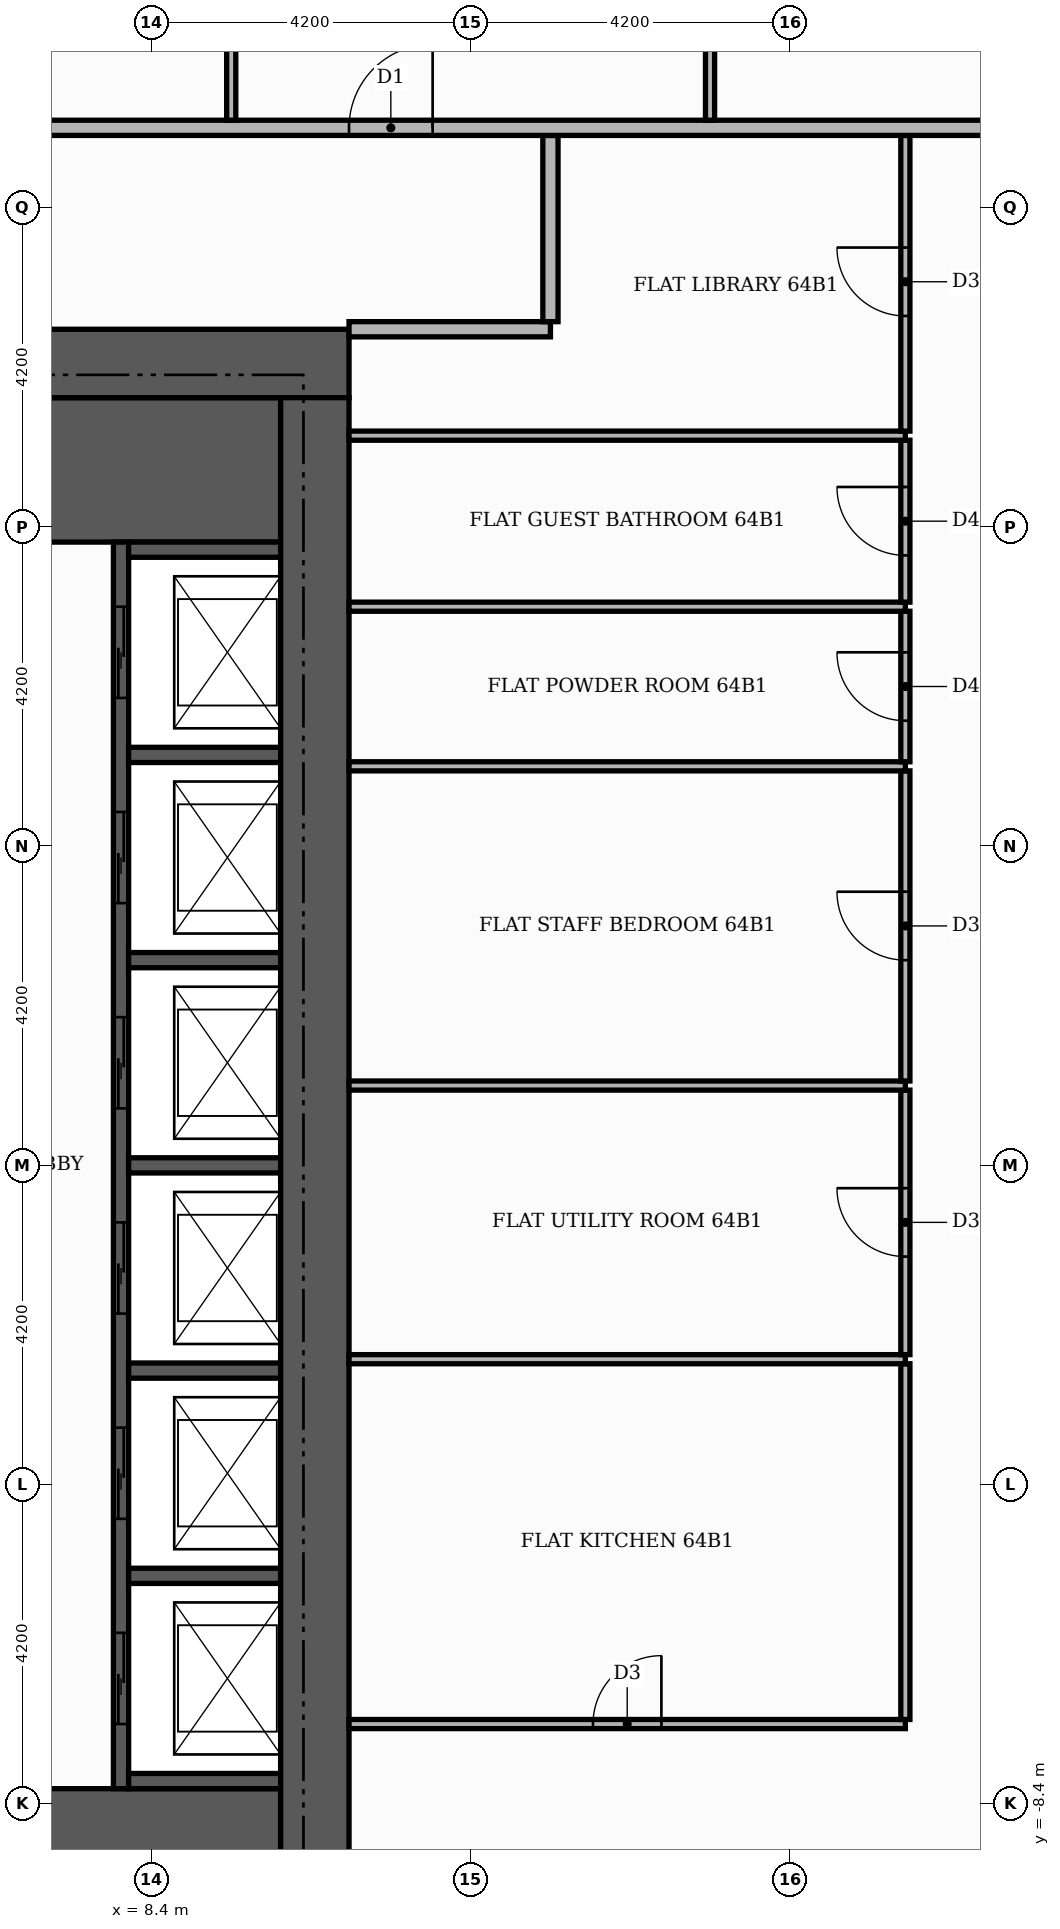
"""IFC4 building model, lengths in metres.
Left out: names, types, materials, properties, quantities, classifications, styles, units other than length and angle.
Written with IfcOpenShell. Run it as: python <this file> out.ifc"""

import sys

from ifc_helpers import new_model, si_unit, direction, frame, frame_2d, origin, place, context, subcontext, project, spatial, rectangle, extrude, element, fill, save


model = new_model("IFC4")
c1 = context("Model", 3, precision=1e-05, world=origin(), true_north=direction((0.0, 1.0)))
c2 = subcontext(c1, "Body", "Model", "MODEL_VIEW")
j1 = project(units=[si_unit("LENGTHUNIT", "METRE"), si_unit("PLANEANGLEUNIT", "RADIAN")], contexts=[c1])
p1 = place(None, origin())
s1 = spatial("IfcSite", under=j1, at=p1, CompositionType="ELEMENT")
p2 = place(p1, origin())
s2 = spatial("IfcBuilding", under=s1, at=p2, CompositionType="ELEMENT")
p3 = place(p2, frame((0.0, 0.0, 267.9)))
s3 = spatial("IfcBuildingStorey", under=s2, at=p3, CompositionType="ELEMENT", Elevation=267.9)
for number, where, z_axis, x_axis in (
    (1, (5.5, -9.15, 0.0), (0.0, 0.0, 1.0), (1.0, 0.0, 0.0)),
    (2, (5.5, 9.15, 0.0), (0.0, 0.0, 1.0), (1.0, 0.0, 0.0)),
):
    element("IfcWall", number, at=place(p3, frame(where, z_axis=z_axis, x_axis=x_axis)), inside=s3, PredefinedType="SHEAR", context=c2, shape_type="SweptSolid", body=[
        extrude(rectangle(XDim=4.6, YDim=1.9, at=frame_2d((2.3, 0.0))), origin(), (0.0, 0.0, 1.0), 3.48),
    ])
p4 = place(p3, frame((8.0, -8.2, 0.0), z_axis=(0.0, 0.0, 1.0), x_axis=(0.0, 1.0, 0.0)))
e3 = element("IfcWall", 3, at=p4, inside=s3, PredefinedType="SHEAR", context=c2, shape_type="SweptSolid", body=[
    extrude(rectangle(XDim=16.4, YDim=0.2, at=frame_2d((8.2, 0.0))), origin(), (0.0, 0.0, 1.0), 3.48),
])
p5 = place(p4, frame((0.85, 0.0, 0.0)))
e4 = element("IfcOpeningElement", 4, at=p5, cuts=e3, PredefinedType="OPENING", context=c2, shape_type="SweptSolid", body=[
    extrude(rectangle(XDim=1.2, YDim=2.1, at=frame_2d((0.6, 1.05))), frame((0.0, 0.11, 0.0), z_axis=(0.0, -1.0, 0.0), x_axis=(1.0, 0.0, 0.0)), (0.0, 0.0, 1.0), 0.22),
])
p6 = place(p4, frame((3.55, 0.0, 0.0)))
e5 = element("IfcOpeningElement", 5, at=p6, cuts=e3, PredefinedType="OPENING", context=c2, shape_type="SweptSolid", body=[
    extrude(rectangle(XDim=1.2, YDim=2.1, at=frame_2d((0.6, 1.05))), frame((0.0, 0.11, 0.0), z_axis=(0.0, -1.0, 0.0), x_axis=(1.0, 0.0, 0.0)), (0.0, 0.0, 1.0), 0.22),
])
p7 = place(p4, frame((6.25, 0.0, 0.0)))
e6 = element("IfcOpeningElement", 6, at=p7, cuts=e3, PredefinedType="OPENING", context=c2, shape_type="SweptSolid", body=[
    extrude(rectangle(XDim=1.2, YDim=2.1, at=frame_2d((0.6, 1.05))), frame((0.0, 0.11, 0.0), z_axis=(0.0, -1.0, 0.0), x_axis=(1.0, 0.0, 0.0)), (0.0, 0.0, 1.0), 0.22),
])
p8 = place(p4, frame((8.95, 0.0, 0.0)))
e7 = element("IfcOpeningElement", 7, at=p8, cuts=e3, PredefinedType="OPENING", context=c2, shape_type="SweptSolid", body=[
    extrude(rectangle(XDim=1.2, YDim=2.1, at=frame_2d((0.6, 1.05))), frame((0.0, 0.11, 0.0), z_axis=(0.0, -1.0, 0.0), x_axis=(1.0, 0.0, 0.0)), (0.0, 0.0, 1.0), 0.22),
])
p9 = place(p4, frame((11.65, 0.0, 0.0)))
e8 = element("IfcOpeningElement", 8, at=p9, cuts=e3, PredefinedType="OPENING", context=c2, shape_type="SweptSolid", body=[
    extrude(rectangle(XDim=1.2, YDim=2.1, at=frame_2d((0.6, 1.05))), frame((0.0, 0.11, 0.0), z_axis=(0.0, -1.0, 0.0), x_axis=(1.0, 0.0, 0.0)), (0.0, 0.0, 1.0), 0.22),
])
p10 = place(p4, frame((14.35, 0.0, 0.0)))
e9 = element("IfcOpeningElement", 9, at=p10, cuts=e3, PredefinedType="OPENING", context=c2, shape_type="SweptSolid", body=[
    extrude(rectangle(XDim=1.2, YDim=2.1, at=frame_2d((0.6, 1.05))), frame((0.0, 0.11, 0.0), z_axis=(0.0, -1.0, 0.0), x_axis=(1.0, 0.0, 0.0)), (0.0, 0.0, 1.0), 0.22),
])
for number, where, z_axis, x_axis in (
    (10, (8.1, -8.1, 0.0), (0.0, 0.0, 1.0), (1.0, 0.0, 0.0)),
    (11, (8.1, -5.4, 0.0), (0.0, 0.0, 1.0), (1.0, 0.0, 0.0)),
    (12, (8.1, -2.7, 0.0), (0.0, 0.0, 1.0), (1.0, 0.0, 0.0)),
    (13, (8.1, 0.0, 0.0), (0.0, 0.0, 1.0), (1.0, 0.0, 0.0)),
    (14, (8.1, 2.7, 0.0), (0.0, 0.0, 1.0), (1.0, 0.0, 0.0)),
    (15, (8.1, 5.4, 0.0), (0.0, 0.0, 1.0), (1.0, 0.0, 0.0)),
    (16, (8.1, 8.1, 0.0), (0.0, 0.0, 1.0), (1.0, 0.0, 0.0)),
):
    element("IfcWall", number, at=place(p3, frame(where, z_axis=z_axis, x_axis=x_axis)), inside=s3, PredefinedType="SHEAR", context=c2, shape_type="SweptSolid", body=[
        extrude(rectangle(XDim=2.0, YDim=0.2, at=frame_2d((1.0, 0.0))), origin(), (0.0, 0.0, 1.0), 3.48),
    ])
p11 = place(p3, frame((-11.0, 10.55, 0.0), z_axis=(0.0, 0.0, 1.0), x_axis=(1.0, 0.0, 0.0)))
e17 = element("IfcWall", 17, at=p11, inside=s3, PredefinedType="SHEAR", context=c2, shape_type="SweptSolid", body=[
    extrude(rectangle(XDim=22.0, YDim=0.9, at=frame_2d((11.0, 0.0))), origin(), (0.0, 0.0, 1.0), 3.48),
])
p12 = place(p11, frame((13.3, 0.0, 0.0)))
e18 = element("IfcOpeningElement", 18, at=p12, cuts=e17, PredefinedType="OPENING", context=c2, shape_type="SweptSolid", body=[
    extrude(rectangle(XDim=1.8, YDim=2.2, at=frame_2d((0.9, 1.1))), frame((0.0, 0.46, 0.0), z_axis=(0.0, -1.0, 0.0), x_axis=(1.0, 0.0, 0.0)), (0.0, 0.0, 1.0), 0.92),
])
p13 = place(p3, frame((10.55, -10.1, 0.0), z_axis=(0.0, 0.0, 1.0), x_axis=(0.0, 1.0, 0.0)))
e19 = element("IfcWall", 19, at=p13, inside=s3, PredefinedType="SHEAR", context=c2, shape_type="SweptSolid", body=[
    extrude(rectangle(XDim=20.2, YDim=0.9, at=frame_2d((10.1, 0.0))), origin(), (0.0, 0.0, 1.0), 3.48),
])
p14 = place(p3, frame((11.0, -7.35, 0.0), z_axis=(0.0, 0.0, 1.0), x_axis=(1.0, 0.0, 0.0)))
e20 = element("IfcWall", 20, at=p14, inside=s3, PredefinedType="PARTITIONING", context=c2, shape_type="SweptSolid", body=[
    extrude(rectangle(XDim=7.32, YDim=0.12, at=frame_2d((3.66, 0.0))), origin(), (0.0, 0.0, 1.0), 3.48),
])
p15 = place(p14, frame((3.21, 0.0, 0.0)))
e21 = element("IfcOpeningElement", 21, at=p15, cuts=e20, PredefinedType="OPENING", context=c2, shape_type="SweptSolid", body=[
    extrude(rectangle(XDim=0.9, YDim=2.1, at=frame_2d((0.45, 1.05))), frame((0.0, 0.07, 0.0), z_axis=(0.0, -1.0, 0.0), x_axis=(1.0, 0.0, 0.0)), (0.0, 0.0, 1.0), 0.14),
])
p16 = place(p3, frame((18.32, -7.29, 0.0), z_axis=(0.0, 0.0, 1.0), x_axis=(0.0, 1.0, 0.0)))
e22 = element("IfcWall", 22, at=p16, inside=s3, PredefinedType="PARTITIONING", context=c2, shape_type="SweptSolid", body=[
    extrude(rectangle(XDim=4.68, YDim=0.12, at=frame_2d((2.34, 0.0))), origin(), (0.0, 0.0, 1.0), 3.48),
])
p17 = place(p3, frame((11.0, -2.55, 0.0), z_axis=(0.0, 0.0, 1.0), x_axis=(1.0, 0.0, 0.0)))
e23 = element("IfcWall", 23, at=p17, inside=s3, PredefinedType="PARTITIONING", context=c2, shape_type="SweptSolid", body=[
    extrude(rectangle(XDim=7.32, YDim=0.12, at=frame_2d((3.66, 0.0))), origin(), (0.0, 0.0, 1.0), 3.48),
])
p18 = place(p3, frame((18.32, -2.49, 0.0), z_axis=(0.0, 0.0, 1.0), x_axis=(0.0, 1.0, 0.0)))
e24 = element("IfcWall", 24, at=p18, inside=s3, PredefinedType="PARTITIONING", context=c2, shape_type="SweptSolid", body=[
    extrude(rectangle(XDim=3.48, YDim=0.12, at=frame_2d((1.74, 0.0))), origin(), (0.0, 0.0, 1.0), 3.48),
])
p19 = place(p18, frame((1.29, 0.0, 0.0)))
e25 = element("IfcOpeningElement", 25, at=p19, cuts=e24, PredefinedType="OPENING", context=c2, shape_type="SweptSolid", body=[
    extrude(rectangle(XDim=0.9, YDim=2.1, at=frame_2d((0.45, 1.05))), frame((0.0, 0.07, 0.0), z_axis=(0.0, -1.0, 0.0), x_axis=(1.0, 0.0, 0.0)), (0.0, 0.0, 1.0), 0.14),
])
p20 = place(p3, frame((11.0, 1.05, 0.0), z_axis=(0.0, 0.0, 1.0), x_axis=(1.0, 0.0, 0.0)))
e26 = element("IfcWall", 26, at=p20, inside=s3, PredefinedType="PARTITIONING", context=c2, shape_type="SweptSolid", body=[
    extrude(rectangle(XDim=7.32, YDim=0.12, at=frame_2d((3.66, 0.0))), origin(), (0.0, 0.0, 1.0), 3.48),
])
p21 = place(p3, frame((18.32, 1.11, 0.0), z_axis=(0.0, 0.0, 1.0), x_axis=(0.0, 1.0, 0.0)))
e27 = element("IfcWall", 27, at=p21, inside=s3, PredefinedType="PARTITIONING", context=c2, shape_type="SweptSolid", body=[
    extrude(rectangle(XDim=4.08, YDim=0.12, at=frame_2d((2.04, 0.0))), origin(), (0.0, 0.0, 1.0), 3.48),
])
p22 = place(p21, frame((1.59, 0.0, 0.0)))
e28 = element("IfcOpeningElement", 28, at=p22, cuts=e27, PredefinedType="OPENING", context=c2, shape_type="SweptSolid", body=[
    extrude(rectangle(XDim=0.9, YDim=2.1, at=frame_2d((0.45, 1.05))), frame((0.0, 0.07, 0.0), z_axis=(0.0, -1.0, 0.0), x_axis=(1.0, 0.0, 0.0)), (0.0, 0.0, 1.0), 0.14),
])
p23 = place(p3, frame((11.0, 5.25, 0.0), z_axis=(0.0, 0.0, 1.0), x_axis=(1.0, 0.0, 0.0)))
e29 = element("IfcWall", 29, at=p23, inside=s3, PredefinedType="PARTITIONING", context=c2, shape_type="SweptSolid", body=[
    extrude(rectangle(XDim=7.32, YDim=0.12, at=frame_2d((3.66, 0.0))), origin(), (0.0, 0.0, 1.0), 3.48),
])
p24 = place(p3, frame((18.32, 5.31, 0.0), z_axis=(0.0, 0.0, 1.0), x_axis=(0.0, 1.0, 0.0)))
e30 = element("IfcWall", 30, at=p24, inside=s3, PredefinedType="PARTITIONING", context=c2, shape_type="SweptSolid", body=[
    extrude(rectangle(XDim=1.98, YDim=0.12, at=frame_2d((0.99, 0.0))), origin(), (0.0, 0.0, 1.0), 3.48),
])
p25 = place(p24, frame((0.54, 0.0, 0.0)))
e31 = element("IfcOpeningElement", 31, at=p25, cuts=e30, PredefinedType="OPENING", context=c2, shape_type="SweptSolid", body=[
    extrude(rectangle(XDim=0.9, YDim=2.1, at=frame_2d((0.45, 1.05))), frame((0.0, 0.07, 0.0), z_axis=(0.0, -1.0, 0.0), x_axis=(1.0, 0.0, 0.0)), (0.0, 0.0, 1.0), 0.14),
])
p26 = place(p3, frame((11.0, 7.35, 0.0), z_axis=(0.0, 0.0, 1.0), x_axis=(1.0, 0.0, 0.0)))
e32 = element("IfcWall", 32, at=p26, inside=s3, PredefinedType="PARTITIONING", context=c2, shape_type="SweptSolid", body=[
    extrude(rectangle(XDim=7.32, YDim=0.12, at=frame_2d((3.66, 0.0))), origin(), (0.0, 0.0, 1.0), 3.48),
])
p27 = place(p3, frame((18.32, 7.41, 0.0), z_axis=(0.0, 0.0, 1.0), x_axis=(0.0, 1.0, 0.0)))
e33 = element("IfcWall", 33, at=p27, inside=s3, PredefinedType="PARTITIONING", context=c2, shape_type="SweptSolid", body=[
    extrude(rectangle(XDim=2.13, YDim=0.12, at=frame_2d((1.065, 0.0))), origin(), (0.0, 0.0, 1.0), 3.48),
])
p28 = place(p27, frame((0.615, 0.0, 0.0)))
e34 = element("IfcOpeningElement", 34, at=p28, cuts=e33, PredefinedType="OPENING", context=c2, shape_type="SweptSolid", body=[
    extrude(rectangle(XDim=0.9, YDim=2.1, at=frame_2d((0.45, 1.05))), frame((0.0, 0.07, 0.0), z_axis=(0.0, -1.0, 0.0), x_axis=(1.0, 0.0, 0.0)), (0.0, 0.0, 1.0), 0.14),
])
p29 = place(p3, frame((11.0, 9.6, 0.0), z_axis=(0.0, 0.0, 1.0), x_axis=(1.0, 0.0, 0.0)))
e35 = element("IfcWall", 35, at=p29, inside=s3, PredefinedType="PARTITIONING", context=c2, shape_type="SweptSolid", body=[
    extrude(rectangle(XDim=7.32, YDim=0.12, at=frame_2d((3.66, 0.0))), origin(), (0.0, 0.0, 1.0), 3.48),
])
p30 = place(p3, frame((18.32, 9.66, 0.0), z_axis=(0.0, 0.0, 1.0), x_axis=(0.0, 1.0, 0.0)))
e36 = element("IfcWall", 36, at=p30, inside=s3, PredefinedType="PARTITIONING", context=c2, shape_type="SweptSolid", body=[
    extrude(rectangle(XDim=3.89, YDim=0.12, at=frame_2d((1.945, 0.0))), origin(), (0.0, 0.0, 1.0), 3.48),
])
p31 = place(p30, frame((1.515, 0.0, 0.0)))
e37 = element("IfcOpeningElement", 37, at=p31, cuts=e36, PredefinedType="OPENING", context=c2, shape_type="SweptSolid", body=[
    extrude(rectangle(XDim=0.9, YDim=2.1, at=frame_2d((0.45, 1.05))), frame((0.0, 0.07, 0.0), z_axis=(0.0, -1.0, 0.0), x_axis=(1.0, 0.0, 0.0)), (0.0, 0.0, 1.0), 0.14),
])
p32 = place(p3, frame((11.0, 11.0, 0.0), z_axis=(0.0, 0.0, 1.0), x_axis=(1.0, 0.0, 0.0)))
e38 = element("IfcWall", 38, at=p32, inside=s3, PredefinedType="PARTITIONING", context=c2, shape_type="SweptSolid", body=[
    extrude(rectangle(XDim=2.65, YDim=0.2, at=frame_2d((1.325, 0.0))), origin(), (0.0, 0.0, 1.0), 3.48),
])
p33 = place(p3, frame((13.65, 11.1, 0.0), z_axis=(0.0, 0.0, 1.0), x_axis=(0.0, 1.0, 0.0)))
e39 = element("IfcWall", 39, at=p33, inside=s3, PredefinedType="PARTITIONING", context=c2, shape_type="SweptSolid", body=[
    extrude(rectangle(XDim=2.45, YDim=0.2, at=frame_2d((1.225, 0.0))), origin(), (0.0, 0.0, 1.0), 3.48),
])
p34 = place(p3, frame((-13.65, 13.65, 0.0), z_axis=(0.0, 0.0, 1.0), x_axis=(1.0, 0.0, 0.0)))
e40 = element("IfcWall", 40, at=p34, inside=s3, PredefinedType="PARTITIONING", context=c2, shape_type="SweptSolid", body=[
    extrude(rectangle(XDim=39.07, YDim=0.2, at=frame_2d((19.535, 0.0))), origin(), (0.0, 0.0, 1.0), 3.48),
])
p35 = place(p34, frame((24.65, 0.0, 0.0)))
e41 = element("IfcOpeningElement", 41, at=p35, cuts=e40, PredefinedType="OPENING", context=c2, shape_type="SweptSolid", body=[
    extrude(rectangle(XDim=1.1, YDim=2.4, at=frame_2d((0.55, 1.2))), frame((0.0, 0.11, 0.0), z_axis=(0.0, -1.0, 0.0), x_axis=(1.0, 0.0, 0.0)), (0.0, 0.0, 1.0), 0.22),
])
p36 = place(p3, frame((9.45, 13.75, 0.0), z_axis=(0.0, 0.0, 1.0), x_axis=(0.0, 1.0, 0.0)))
e42 = element("IfcWall", 42, at=p36, inside=s3, PredefinedType="PARTITIONING", context=c2, shape_type="SweptSolid", body=[
    extrude(rectangle(XDim=4.81, YDim=0.12, at=frame_2d((2.405, 0.0))), origin(), (0.0, 0.0, 1.0), 3.48),
])
p37 = place(p3, frame((15.75, 13.75, 0.0), z_axis=(0.0, 0.0, 1.0), x_axis=(0.0, 1.0, 0.0)))
e43 = element("IfcWall", 43, at=p37, inside=s3, PredefinedType="PARTITIONING", context=c2, shape_type="SweptSolid", body=[
    extrude(rectangle(XDim=6.31, YDim=0.12, at=frame_2d((3.155, 0.0))), origin(), (0.0, 0.0, 1.0), 3.48),
])
p38 = place(p37, frame((2.685, 0.0, 0.0)))
e44 = element("IfcOpeningElement", 44, at=p38, cuts=e43, PredefinedType="OPENING", context=c2, shape_type="SweptSolid", body=[
    extrude(rectangle(XDim=0.9, YDim=2.1, at=frame_2d((0.45, 1.05))), frame((0.0, 0.07, 0.0), z_axis=(0.0, -1.0, 0.0), x_axis=(1.0, 0.0, 0.0)), (0.0, 0.0, 1.0), 0.14),
])
p39 = place(p5, origin())
e45 = element("IfcDoor", 45, at=p39, inside=s3, OperationType="SLIDING_TO_LEFT", PredefinedType="DOOR", context=c2, shape_type="SweptSolid", body=[
    extrude(rectangle(XDim=1.2, YDim=2.1, at=frame_2d((0.6, 1.05))), frame((0.0, 0.025, 0.0), z_axis=(0.0, -1.0, 0.0), x_axis=(1.0, 0.0, 0.0)), (0.0, 0.0, 1.0), 0.05),
])
fill(e4, e45)
p40 = place(p6, origin())
e46 = element("IfcDoor", 46, at=p40, inside=s3, OperationType="SLIDING_TO_LEFT", PredefinedType="DOOR", context=c2, shape_type="SweptSolid", body=[
    extrude(rectangle(XDim=1.2, YDim=2.1, at=frame_2d((0.6, 1.05))), frame((0.0, 0.025, 0.0), z_axis=(0.0, -1.0, 0.0), x_axis=(1.0, 0.0, 0.0)), (0.0, 0.0, 1.0), 0.05),
])
fill(e5, e46)
p41 = place(p7, origin())
e47 = element("IfcDoor", 47, at=p41, inside=s3, OperationType="SLIDING_TO_LEFT", PredefinedType="DOOR", context=c2, shape_type="SweptSolid", body=[
    extrude(rectangle(XDim=1.2, YDim=2.1, at=frame_2d((0.6, 1.05))), frame((0.0, 0.025, 0.0), z_axis=(0.0, -1.0, 0.0), x_axis=(1.0, 0.0, 0.0)), (0.0, 0.0, 1.0), 0.05),
])
fill(e6, e47)
p42 = place(p8, origin())
e48 = element("IfcDoor", 48, at=p42, inside=s3, OperationType="SLIDING_TO_LEFT", PredefinedType="DOOR", context=c2, shape_type="SweptSolid", body=[
    extrude(rectangle(XDim=1.2, YDim=2.1, at=frame_2d((0.6, 1.05))), frame((0.0, 0.025, 0.0), z_axis=(0.0, -1.0, 0.0), x_axis=(1.0, 0.0, 0.0)), (0.0, 0.0, 1.0), 0.05),
])
fill(e7, e48)
p43 = place(p9, origin())
e49 = element("IfcDoor", 49, at=p43, inside=s3, OperationType="SLIDING_TO_LEFT", PredefinedType="DOOR", context=c2, shape_type="SweptSolid", body=[
    extrude(rectangle(XDim=1.2, YDim=2.1, at=frame_2d((0.6, 1.05))), frame((0.0, 0.025, 0.0), z_axis=(0.0, -1.0, 0.0), x_axis=(1.0, 0.0, 0.0)), (0.0, 0.0, 1.0), 0.05),
])
fill(e8, e49)
p44 = place(p10, origin())
e50 = element("IfcDoor", 50, at=p44, inside=s3, OperationType="SLIDING_TO_LEFT", PredefinedType="DOOR", context=c2, shape_type="SweptSolid", body=[
    extrude(rectangle(XDim=1.2, YDim=2.1, at=frame_2d((0.6, 1.05))), frame((0.0, 0.025, 0.0), z_axis=(0.0, -1.0, 0.0), x_axis=(1.0, 0.0, 0.0)), (0.0, 0.0, 1.0), 0.05),
])
fill(e9, e50)
p45 = place(p15, origin())
e51 = element("IfcDoor", 51, at=p45, inside=s3, OperationType="SINGLE_SWING_RIGHT", PredefinedType="DOOR", context=c2, shape_type="SweptSolid", body=[
    extrude(rectangle(XDim=0.9, YDim=2.1, at=frame_2d((0.45, 1.05))), frame((0.0, 0.025, 0.0), z_axis=(0.0, -1.0, 0.0), x_axis=(1.0, 0.0, 0.0)), (0.0, 0.0, 1.0), 0.05),
])
fill(e21, e51)
p46 = place(p19, origin())
e52 = element("IfcDoor", 52, at=p46, inside=s3, OperationType="SINGLE_SWING_RIGHT", PredefinedType="DOOR", context=c2, shape_type="SweptSolid", body=[
    extrude(rectangle(XDim=0.9, YDim=2.1, at=frame_2d((0.45, 1.05))), frame((0.0, 0.025, 0.0), z_axis=(0.0, -1.0, 0.0), x_axis=(1.0, 0.0, 0.0)), (0.0, 0.0, 1.0), 0.05),
])
fill(e25, e52)
p47 = place(p22, origin())
e53 = element("IfcDoor", 53, at=p47, inside=s3, OperationType="SINGLE_SWING_RIGHT", PredefinedType="DOOR", context=c2, shape_type="SweptSolid", body=[
    extrude(rectangle(XDim=0.9, YDim=2.1, at=frame_2d((0.45, 1.05))), frame((0.0, 0.025, 0.0), z_axis=(0.0, -1.0, 0.0), x_axis=(1.0, 0.0, 0.0)), (0.0, 0.0, 1.0), 0.05),
])
fill(e28, e53)
p48 = place(p25, origin())
e54 = element("IfcDoor", 54, at=p48, inside=s3, OperationType="SINGLE_SWING_RIGHT", PredefinedType="DOOR", context=c2, shape_type="SweptSolid", body=[
    extrude(rectangle(XDim=0.9, YDim=2.1, at=frame_2d((0.45, 1.05))), frame((0.0, 0.025, 0.0), z_axis=(0.0, -1.0, 0.0), x_axis=(1.0, 0.0, 0.0)), (0.0, 0.0, 1.0), 0.05),
])
fill(e31, e54)
p49 = place(p28, origin())
e55 = element("IfcDoor", 55, at=p49, inside=s3, OperationType="SINGLE_SWING_RIGHT", PredefinedType="DOOR", context=c2, shape_type="SweptSolid", body=[
    extrude(rectangle(XDim=0.9, YDim=2.1, at=frame_2d((0.45, 1.05))), frame((0.0, 0.025, 0.0), z_axis=(0.0, -1.0, 0.0), x_axis=(1.0, 0.0, 0.0)), (0.0, 0.0, 1.0), 0.05),
])
fill(e34, e55)
p50 = place(p31, origin())
e56 = element("IfcDoor", 56, at=p50, inside=s3, OperationType="SINGLE_SWING_RIGHT", PredefinedType="DOOR", context=c2, shape_type="SweptSolid", body=[
    extrude(rectangle(XDim=0.9, YDim=2.1, at=frame_2d((0.45, 1.05))), frame((0.0, 0.025, 0.0), z_axis=(0.0, -1.0, 0.0), x_axis=(1.0, 0.0, 0.0)), (0.0, 0.0, 1.0), 0.05),
])
fill(e37, e56)
p51 = place(p35, origin())
e57 = element("IfcDoor", 57, at=p51, inside=s3, OperationType="SINGLE_SWING_RIGHT", PredefinedType="DOOR", context=c2, shape_type="SweptSolid", body=[
    extrude(rectangle(XDim=1.1, YDim=2.4, at=frame_2d((0.55, 1.2))), frame((0.0, 0.025, 0.0), z_axis=(0.0, -1.0, 0.0), x_axis=(1.0, 0.0, 0.0)), (0.0, 0.0, 1.0), 0.05),
])
fill(e41, e57)
save(model, sys.argv[1])
